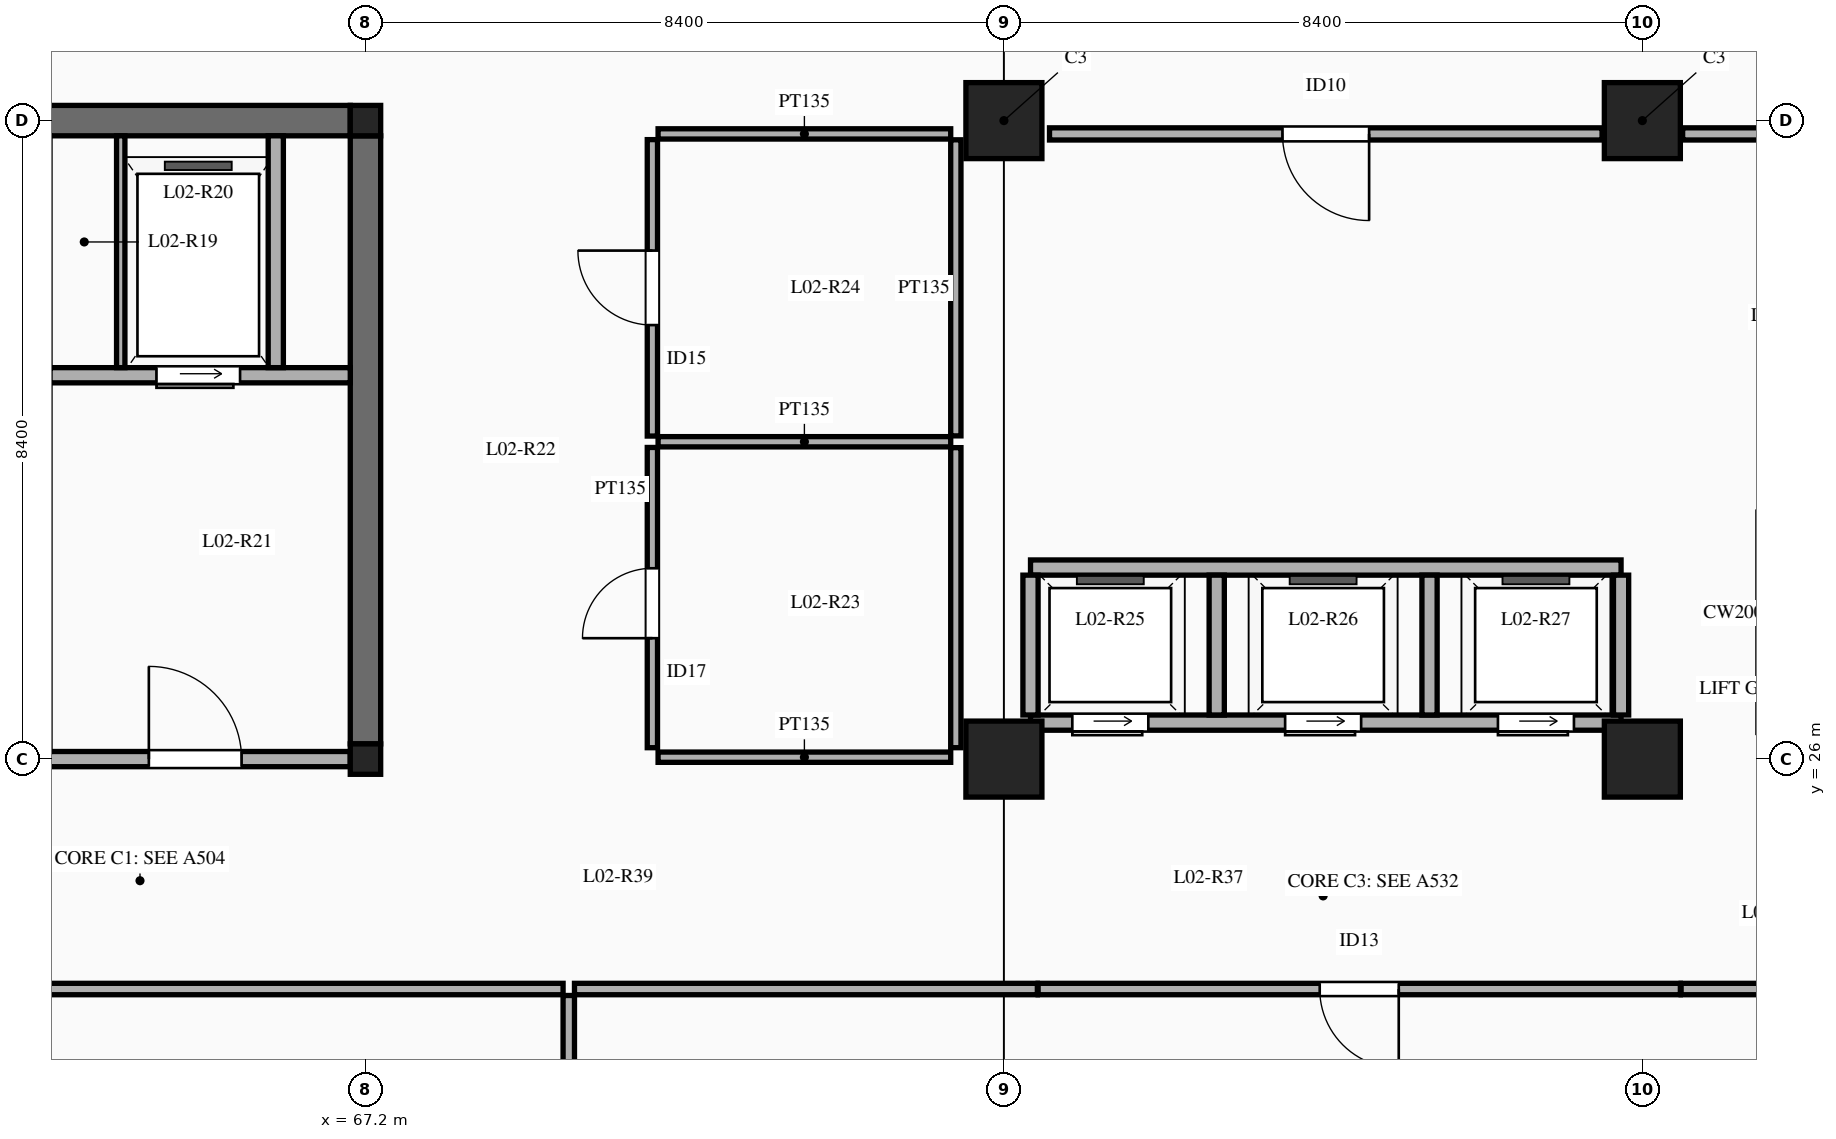
"""IFC4 building model, lengths in metres.
Left out: names, types, materials, properties, quantities, classifications, styles, units other than length and angle.
Written with IfcOpenShell. Run it as: python <this file> out.ifc"""

import sys

from ifc_helpers import new_model, si_unit, direction, frame, frame_2d, origin, origin_2d, place, context, subcontext, project, spatial, rectangle, extrude, element, fill, save


model = new_model("IFC4")
c1 = context("Model", 3, precision=1e-05, world=origin(), true_north=direction((0.0, 1.0)))
c2 = subcontext(c1, "Body", "Model", "MODEL_VIEW")
j1 = project(units=[si_unit("LENGTHUNIT", "METRE"), si_unit("PLANEANGLEUNIT", "RADIAN")], contexts=[c1])
p1 = place(None, origin())
s1 = spatial("IfcSite", under=j1, at=p1, CompositionType="ELEMENT")
p2 = place(p1, origin())
s2 = spatial("IfcBuilding", under=s1, at=p2, CompositionType="ELEMENT")
p3 = place(p2, frame((0.0, 0.0, 10.2)))
s3 = spatial("IfcBuildingStorey", under=s2, at=p3, CompositionType="ELEMENT", Elevation=10.2)
for number, where, z_axis, x_axis in (
    (1, (67.2, 26.0, 0.0), (0.0, 0.0, 1.0), (1.0, 0.0, 0.0)),
    (2, (67.2, 34.4, 0.0), (0.0, 0.0, 1.0), (1.0, 0.0, 0.0)),
):
    element("IfcColumn", number, at=place(p3, frame(where, z_axis=z_axis, x_axis=x_axis)), inside=s3, PredefinedType="COLUMN", context=c2, shape_type="SweptSolid", body=[
        extrude(rectangle(XDim=0.4, YDim=0.4, at=origin_2d()), origin(), (0.0, 0.0, 1.0), 4.8),
    ])
for number, where, z_axis, x_axis in (
    (3, (75.6, 26.0, 0.0), (0.0, 0.0, 1.0), (1.0, 0.0, 0.0)),
    (4, (75.6, 34.4, 0.0), (0.0, 0.0, 1.0), (1.0, 0.0, 0.0)),
    (5, (84.0, 26.0, 0.0), (0.0, 0.0, 1.0), (1.0, 0.0, 0.0)),
    (6, (84.0, 34.4, 0.0), (0.0, 0.0, 1.0), (1.0, 0.0, 0.0)),
):
    element("IfcColumn", number, at=place(p3, frame(where, z_axis=z_axis, x_axis=x_axis)), inside=s3, PredefinedType="COLUMN", context=c2, shape_type="SweptSolid", body=[
        extrude(rectangle(XDim=1.0, YDim=1.0, at=origin_2d()), origin(), (0.0, 0.0, 1.0), 4.8),
    ])
for number, where, z_axis, x_axis in (
    (7, (67.2, 26.2, 0.0), (0.0, 0.0, 1.0), (0.0, 1.0, 0.0)),
    (8, (59.0, 34.4, 0.0), (0.0, 0.0, 1.0), (1.0, 0.0, 0.0)),
):
    element("IfcWall", number, at=place(p3, frame(where, z_axis=z_axis, x_axis=x_axis)), inside=s3, PredefinedType="SHEAR", context=c2, shape_type="SweptSolid", body=[
        extrude(rectangle(XDim=8.0, YDim=0.4, at=frame_2d((4.0, 0.0))), origin(), (0.0, 0.0, 1.0), 4.8),
    ])
p4 = place(p3, frame((59.0, 26.0, 0.0), z_axis=(0.0, 0.0, 1.0), x_axis=(1.0, 0.0, 0.0)))
e9 = element("IfcWall", 9, at=p4, inside=s3, PredefinedType="SOLIDWALL", context=c2, shape_type="SweptSolid", body=[
    extrude(rectangle(XDim=8.0, YDim=0.2, at=frame_2d((4.0, 0.0))), origin(), (0.0, 0.0, 1.0), 3.93),
])
p5 = place(p4, frame((1.55, 0.0, 0.0)))
e10 = element("IfcOpeningElement", 10, at=p5, cuts=e9, PredefinedType="OPENING", context=c2, shape_type="SweptSolid", body=[
    extrude(rectangle(XDim=1.15, YDim=2.15, at=frame_2d((0.575, 1.075))), frame((0.0, 0.11, 0.0), z_axis=(0.0, -1.0, 0.0), x_axis=(1.0, 0.0, 0.0)), (0.0, 0.0, 1.0), 0.22),
])
p6 = place(p4, frame((5.35, 0.0, 0.0)))
e11 = element("IfcOpeningElement", 11, at=p6, cuts=e9, PredefinedType="OPENING", context=c2, shape_type="SweptSolid", body=[
    extrude(rectangle(XDim=1.22, YDim=2.15, at=frame_2d((0.61, 1.075))), frame((0.0, 0.11, 0.0), z_axis=(0.0, -1.0, 0.0), x_axis=(1.0, 0.0, 0.0)), (0.0, 0.0, 1.0), 0.22),
])
p7 = place(p3, frame((63.05, 31.05, 0.0), z_axis=(0.0, 0.0, 1.0), x_axis=(1.0, 0.0, 0.0)))
e12 = element("IfcWall", 12, at=p7, inside=s3, PredefinedType="SOLIDWALL", context=c2, shape_type="SweptSolid", body=[
    extrude(rectangle(XDim=3.95, YDim=0.2, at=frame_2d((1.975, 0.0))), origin(), (0.0, 0.0, 1.0), 4.55),
])
p8 = place(p7, frame((1.4, 0.0, 0.0)))
e13 = element("IfcOpeningElement", 13, at=p8, cuts=e12, PredefinedType="OPENING", context=c2, shape_type="SweptSolid", body=[
    extrude(rectangle(XDim=1.1, YDim=2.15, at=frame_2d((0.55, 1.075))), frame((0.0, 0.11, 0.0), z_axis=(0.0, -1.0, 0.0), x_axis=(1.0, 0.0, 0.0)), (0.0, 0.0, 1.0), 0.22),
])
p9 = place(p3, frame((63.98, 31.15, 0.0), z_axis=(0.0, 0.0, 1.0), x_axis=(0.0, 1.0, 0.0)))
e14 = element("IfcWall", 14, at=p9, inside=s3, PredefinedType="PARTITIONING", context=c2, shape_type="SweptSolid", body=[
    extrude(rectangle(XDim=3.05, YDim=0.11, at=frame_2d((1.525, 0.0))), origin(), (0.0, 0.0, 1.0), 4.55),
])
p10 = place(p3, frame((66.02, 31.15, 0.0), z_axis=(0.0, 0.0, 1.0), x_axis=(0.0, 1.0, 0.0)))
e15 = element("IfcWall", 15, at=p10, inside=s3, PredefinedType="SOLIDWALL", context=c2, shape_type="SweptSolid", body=[
    extrude(rectangle(XDim=3.05, YDim=0.2, at=frame_2d((1.525, 0.0))), origin(), (0.0, 0.0, 1.0), 4.55),
])
p11 = place(p3, frame((75.95, 26.48, 0.0), z_axis=(0.0, 0.0, 1.0), x_axis=(1.0, 0.0, 0.0)))
e16 = element("IfcWall", 16, at=p11, inside=s3, PredefinedType="SOLIDWALL", context=c2, shape_type="SweptSolid", body=[
    extrude(rectangle(XDim=7.77, YDim=0.2, at=frame_2d((3.885, 0.0))), origin(), (0.0, 0.0, 1.0), 4.55),
])
p12 = place(p11, frame((0.55, 0.0, 0.0)))
e17 = element("IfcOpeningElement", 17, at=p12, cuts=e16, PredefinedType="OPENING", context=c2, shape_type="SweptSolid", body=[
    extrude(rectangle(XDim=1.0, YDim=2.15, at=frame_2d((0.5, 1.075))), frame((0.0, 0.11, 0.0), z_axis=(0.0, -1.0, 0.0), x_axis=(1.0, 0.0, 0.0)), (0.0, 0.0, 1.0), 0.22),
])
p13 = place(p11, frame((3.35, 0.0, 0.0)))
e18 = element("IfcOpeningElement", 18, at=p13, cuts=e16, PredefinedType="OPENING", context=c2, shape_type="SweptSolid", body=[
    extrude(rectangle(XDim=1.0, YDim=2.15, at=frame_2d((0.5, 1.075))), frame((0.0, 0.11, 0.0), z_axis=(0.0, -1.0, 0.0), x_axis=(1.0, 0.0, 0.0)), (0.0, 0.0, 1.0), 0.22),
])
p14 = place(p11, frame((6.15, 0.0, 0.0)))
e19 = element("IfcOpeningElement", 19, at=p14, cuts=e16, PredefinedType="OPENING", context=c2, shape_type="SweptSolid", body=[
    extrude(rectangle(XDim=1.0, YDim=2.15, at=frame_2d((0.5, 1.075))), frame((0.0, 0.11, 0.0), z_axis=(0.0, -1.0, 0.0), x_axis=(1.0, 0.0, 0.0)), (0.0, 0.0, 1.0), 0.22),
])
p15 = place(p3, frame((75.95, 28.52, 0.0), z_axis=(0.0, 0.0, 1.0), x_axis=(1.0, 0.0, 0.0)))
e20 = element("IfcWall", 20, at=p15, inside=s3, PredefinedType="SOLIDWALL", context=c2, shape_type="SweptSolid", body=[
    extrude(rectangle(XDim=7.77, YDim=0.2, at=frame_2d((3.885, 0.0))), origin(), (0.0, 0.0, 1.0), 4.55),
])
p16 = place(p3, frame((75.95, 26.58, 0.0), z_axis=(0.0, 0.0, 1.0), x_axis=(0.0, 1.0, 0.0)))
e21 = element("IfcWall", 21, at=p16, inside=s3, PredefinedType="SOLIDWALL", context=c2, shape_type="SweptSolid", body=[
    extrude(rectangle(XDim=1.84, YDim=0.2, at=frame_2d((0.92, 0.0))), origin(), (0.0, 0.0, 1.0), 4.03),
])
for number, where, z_axis, x_axis in (
    (22, (78.4, 26.58, 0.0), (0.0, 0.0, 1.0), (0.0, 1.0, 0.0)),
    (23, (81.2, 26.58, 0.0), (0.0, 0.0, 1.0), (0.0, 1.0, 0.0)),
):
    element("IfcWall", number, at=place(p3, frame(where, z_axis=z_axis, x_axis=x_axis)), inside=s3, PredefinedType="SOLIDWALL", context=c2, shape_type="SweptSolid", body=[
        extrude(rectangle(XDim=1.84, YDim=0.2, at=frame_2d((0.92, 0.0))), origin(), (0.0, 0.0, 1.0), 4.55),
    ])
p17 = place(p3, frame((83.72, 26.58, 0.0), z_axis=(0.0, 0.0, 1.0), x_axis=(0.0, 1.0, 0.0)))
e24 = element("IfcWall", 24, at=p17, inside=s3, PredefinedType="SOLIDWALL", context=c2, shape_type="SweptSolid", body=[
    extrude(rectangle(XDim=1.84, YDim=0.2, at=frame_2d((0.92, 0.0))), origin(), (0.0, 0.0, 1.0), 4.03),
])
p18 = place(p3, frame((70.975, 26.15, 0.0), z_axis=(0.0, 0.0, 1.0), x_axis=(0.0, 1.0, 0.0)))
e25 = element("IfcWall", 25, at=p18, inside=s3, PredefinedType="PARTITIONING", context=c2, shape_type="SweptSolid", body=[
    extrude(rectangle(XDim=3.95, YDim=0.135, at=frame_2d((1.975, 0.0))), origin(), (0.0, 0.0, 1.0), 3.75),
])
p19 = place(p18, frame((1.441, 0.0, 0.0)))
e26 = element("IfcOpeningElement", 26, at=p19, cuts=e25, PredefinedType="OPENING", context=c2, shape_type="SweptSolid", body=[
    extrude(rectangle(XDim=0.92, YDim=2.12, at=frame_2d((0.46, 1.06))), frame((0.0, 0.077, 0.0), z_axis=(0.0, -1.0, 0.0), x_axis=(1.0, 0.0, 0.0)), (0.0, 0.0, 1.0), 0.155),
])
p20 = place(p3, frame((70.975, 30.25, 0.0), z_axis=(0.0, 0.0, 1.0), x_axis=(0.0, 1.0, 0.0)))
e27 = element("IfcWall", 27, at=p20, inside=s3, PredefinedType="PARTITIONING", context=c2, shape_type="SweptSolid", body=[
    extrude(rectangle(XDim=3.9, YDim=0.135, at=frame_2d((1.95, 0.0))), origin(), (0.0, 0.0, 1.0), 3.75),
])
p21 = place(p20, frame((1.46, 0.0, 0.0)))
e28 = element("IfcOpeningElement", 28, at=p21, cuts=e27, PredefinedType="OPENING", context=c2, shape_type="SweptSolid", body=[
    extrude(rectangle(XDim=0.98, YDim=2.15, at=frame_2d((0.49, 1.075))), frame((0.0, 0.077, 0.0), z_axis=(0.0, -1.0, 0.0), x_axis=(1.0, 0.0, 0.0)), (0.0, 0.0, 1.0), 0.155),
])
for number, where, z_axis, x_axis in (
    (29, (71.05, 30.175, 0.0), (0.0, 0.0, 1.0), (1.0, 0.0, 0.0)),
    (30, (71.05, 26.025, 0.0), (0.0, 0.0, 1.0), (1.0, 0.0, 0.0)),
    (31, (71.05, 34.225, 0.0), (0.0, 0.0, 1.0), (1.0, 0.0, 0.0)),
):
    element("IfcWall", number, at=place(p3, frame(where, z_axis=z_axis, x_axis=x_axis)), inside=s3, PredefinedType="PARTITIONING", context=c2, shape_type="SweptSolid", body=[
        extrude(rectangle(XDim=3.85, YDim=0.135, at=frame_2d((1.925, 0.0))), origin(), (0.0, 0.0, 1.0), 3.75),
    ])
p22 = place(p3, frame((76.2, 34.225, 0.0), z_axis=(0.0, 0.0, 1.0), x_axis=(1.0, 0.0, 0.0)))
e32 = element("IfcWall", 32, at=p22, inside=s3, PredefinedType="PARTITIONING", context=c2, shape_type="SweptSolid", body=[
    extrude(rectangle(XDim=7.27, YDim=0.16, at=frame_2d((3.635, 0.0))), origin(), (0.0, 0.0, 1.0), 3.75),
])
p23 = place(p22, frame((3.065, 0.0, 0.0)))
e33 = element("IfcOpeningElement", 33, at=p23, cuts=e32, PredefinedType="OPENING", context=c2, shape_type="SweptSolid", body=[
    extrude(rectangle(XDim=1.14, YDim=2.22, at=frame_2d((0.57, 1.11))), frame((0.0, 0.09, 0.0), z_axis=(0.0, -1.0, 0.0), x_axis=(1.0, 0.0, 0.0)), (0.0, 0.0, 1.0), 0.18),
])
p24 = place(p3, frame((84.53, 34.225, 0.0), z_axis=(0.0, 0.0, 1.0), x_axis=(1.0, 0.0, 0.0)))
e34 = element("IfcWall", 34, at=p24, inside=s3, PredefinedType="PARTITIONING", context=c2, shape_type="SweptSolid", body=[
    extrude(rectangle(XDim=3.705, YDim=0.16, at=frame_2d((1.853, 0.0))), origin(), (0.0, 0.0, 1.0), 3.75),
])
p25 = place(p3, frame((76.05, 22.975, 0.0), z_axis=(0.0, 0.0, 1.0), x_axis=(1.0, 0.0, 0.0)))
e35 = element("IfcWall", 35, at=p25, inside=s3, PredefinedType="PARTITIONING", context=c2, shape_type="SweptSolid", body=[
    extrude(rectangle(XDim=8.45, YDim=0.15, at=frame_2d((4.225, 0.0))), origin(), (0.0, 0.0, 1.0), 3.75),
])
p26 = place(p25, frame((3.705, 0.0, 0.0)))
e36 = element("IfcOpeningElement", 36, at=p26, cuts=e35, PredefinedType="OPENING", context=c2, shape_type="SweptSolid", body=[
    extrude(rectangle(XDim=1.04, YDim=2.15, at=frame_2d((0.52, 1.075))), frame((0.0, 0.085, 0.0), z_axis=(0.0, -1.0, 0.0), x_axis=(1.0, 0.0, 0.0)), (0.0, 0.0, 1.0), 0.17),
])
p27 = place(p3, frame((84.51, 22.975, 0.0), z_axis=(0.0, 0.0, 1.0), x_axis=(1.0, 0.0, 0.0)))
e37 = element("IfcWall", 37, at=p27, inside=s3, PredefinedType="PARTITIONING", context=c2, shape_type="SweptSolid", body=[
    extrude(rectangle(XDim=3.89, YDim=0.15, at=frame_2d((1.945, 0.0))), origin(), (0.0, 0.0, 1.0), 3.75),
])
p28 = place(p3, frame((50.85, 22.975, 0.0), z_axis=(0.0, 0.0, 1.0), x_axis=(1.0, 0.0, 0.0)))
e38 = element("IfcWall", 38, at=p28, inside=s3, PredefinedType="PARTITIONING", context=c2, shape_type="SweptSolid", body=[
    extrude(rectangle(XDim=18.95, YDim=0.15, at=frame_2d((9.475, 0.0))), origin(), (0.0, 0.0, 1.0), 3.75),
])
p29 = place(p28, frame((9.276, 0.0, 0.0)))
e39 = element("IfcOpeningElement", 39, at=p29, cuts=e38, PredefinedType="OPENING", context=c2, shape_type="SweptSolid", body=[
    extrude(rectangle(XDim=1.0, YDim=2.15, at=frame_2d((0.5, 1.075))), frame((0.0, 0.085, 0.0), z_axis=(0.0, -1.0, 0.0), x_axis=(1.0, 0.0, 0.0)), (0.0, 0.0, 1.0), 0.17),
])
p30 = place(p3, frame((69.95, 22.975, 0.0), z_axis=(0.0, 0.0, 1.0), x_axis=(1.0, 0.0, 0.0)))
e40 = element("IfcWall", 40, at=p30, inside=s3, PredefinedType="PARTITIONING", context=c2, shape_type="SweptSolid", body=[
    extrude(rectangle(XDim=6.09, YDim=0.15, at=frame_2d((3.045, 0.0))), origin(), (0.0, 0.0, 1.0), 3.75),
])
p31 = place(p3, frame((69.875, 9.65, 0.0), z_axis=(0.0, 0.0, 1.0), x_axis=(0.0, 1.0, 0.0)))
e41 = element("IfcWall", 41, at=p31, inside=s3, PredefinedType="PARTITIONING", context=c2, shape_type="SweptSolid", body=[
    extrude(rectangle(XDim=13.24, YDim=0.15, at=frame_2d((6.62, 0.0))), origin(), (0.0, 0.0, 1.0), 3.75),
])
p32 = place(p3, frame((74.968, 26.15, 0.0), z_axis=(0.0, 0.0, 1.0), x_axis=(0.0, 1.0, 0.0)))
e42 = element("IfcWall", 42, at=p32, inside=s3, PredefinedType="PARTITIONING", context=c2, shape_type="SweptSolid", body=[
    extrude(rectangle(XDim=3.948, YDim=0.135, at=frame_2d((1.974, 0.0))), origin(), (0.0, 0.0, 1.0), 3.75),
])
p33 = place(p3, frame((74.968, 30.252, 0.0), z_axis=(0.0, 0.0, 1.0), x_axis=(0.0, 1.0, 0.0)))
e43 = element("IfcWall", 43, at=p33, inside=s3, PredefinedType="PARTITIONING", context=c2, shape_type="SweptSolid", body=[
    extrude(rectangle(XDim=3.895, YDim=0.135, at=frame_2d((1.948, 0.0))), origin(), (0.0, 0.0, 1.0), 3.75),
])
p34 = place(p6, origin())
e44 = element("IfcDoor", 44, at=p34, inside=s3, OperationType="SINGLE_SWING_LEFT", PredefinedType="DOOR", context=c2, shape_type="SweptSolid", body=[
    extrude(rectangle(XDim=1.22, YDim=2.15, at=frame_2d((0.61, 1.075))), frame((0.0, 0.025, 0.0), z_axis=(0.0, -1.0, 0.0), x_axis=(1.0, 0.0, 0.0)), (0.0, 0.0, 1.0), 0.05),
])
fill(e11, e44)
p35 = place(p8, frame((1.1, 0.0, 0.0), z_axis=(0.0, 0.0, 1.0), x_axis=(-1.0, 0.0, 0.0)))
e45 = element("IfcDoor", 45, at=p35, inside=s3, OperationType="SLIDING_TO_LEFT", PredefinedType="DOOR", context=c2, shape_type="SweptSolid", body=[
    extrude(rectangle(XDim=1.1, YDim=2.15, at=frame_2d((0.55, 1.075))), frame((0.0, 0.025, 0.0), z_axis=(0.0, -1.0, 0.0), x_axis=(1.0, 0.0, 0.0)), (0.0, 0.0, 1.0), 0.05),
])
fill(e13, e45)
p36 = place(p12, frame((1.0, 0.0, 0.0), z_axis=(0.0, 0.0, 1.0), x_axis=(-1.0, 0.0, 0.0)))
e46 = element("IfcDoor", 46, at=p36, inside=s3, OperationType="SLIDING_TO_LEFT", PredefinedType="DOOR", context=c2, shape_type="SweptSolid", body=[
    extrude(rectangle(XDim=1.0, YDim=2.15, at=frame_2d((0.5, 1.075))), frame((0.0, 0.025, 0.0), z_axis=(0.0, -1.0, 0.0), x_axis=(1.0, 0.0, 0.0)), (0.0, 0.0, 1.0), 0.05),
])
fill(e17, e46)
p37 = place(p13, frame((1.0, 0.0, 0.0), z_axis=(0.0, 0.0, 1.0), x_axis=(-1.0, 0.0, 0.0)))
e47 = element("IfcDoor", 47, at=p37, inside=s3, OperationType="SLIDING_TO_LEFT", PredefinedType="DOOR", context=c2, shape_type="SweptSolid", body=[
    extrude(rectangle(XDim=1.0, YDim=2.15, at=frame_2d((0.5, 1.075))), frame((0.0, 0.025, 0.0), z_axis=(0.0, -1.0, 0.0), x_axis=(1.0, 0.0, 0.0)), (0.0, 0.0, 1.0), 0.05),
])
fill(e18, e47)
p38 = place(p14, frame((1.0, 0.0, 0.0), z_axis=(0.0, 0.0, 1.0), x_axis=(-1.0, 0.0, 0.0)))
e48 = element("IfcDoor", 48, at=p38, inside=s3, OperationType="SLIDING_TO_LEFT", PredefinedType="DOOR", context=c2, shape_type="SweptSolid", body=[
    extrude(rectangle(XDim=1.0, YDim=2.15, at=frame_2d((0.5, 1.075))), frame((0.0, 0.025, 0.0), z_axis=(0.0, -1.0, 0.0), x_axis=(1.0, 0.0, 0.0)), (0.0, 0.0, 1.0), 0.05),
])
fill(e19, e48)
p39 = place(p19, origin())
e49 = element("IfcDoor", 49, at=p39, inside=s3, OperationType="SINGLE_SWING_LEFT", PredefinedType="DOOR", context=c2, shape_type="SweptSolid", body=[
    extrude(rectangle(XDim=0.92, YDim=2.12, at=frame_2d((0.46, 1.06))), frame((0.0, 0.025, 0.0), z_axis=(0.0, -1.0, 0.0), x_axis=(1.0, 0.0, 0.0)), (0.0, 0.0, 1.0), 0.05),
])
fill(e26, e49)
p40 = place(p21, origin())
e50 = element("IfcDoor", 50, at=p40, inside=s3, OperationType="SINGLE_SWING_RIGHT", PredefinedType="DOOR", context=c2, shape_type="SweptSolid", body=[
    extrude(rectangle(XDim=0.98, YDim=2.15, at=frame_2d((0.49, 1.075))), frame((0.0, 0.025, 0.0), z_axis=(0.0, -1.0, 0.0), x_axis=(1.0, 0.0, 0.0)), (0.0, 0.0, 1.0), 0.05),
])
fill(e28, e50)
p41 = place(p23, frame((1.14, 0.0, 0.0), z_axis=(0.0, 0.0, 1.0), x_axis=(-1.0, 0.0, 0.0)))
e51 = element("IfcDoor", 51, at=p41, inside=s3, OperationType="SINGLE_SWING_LEFT", PredefinedType="DOOR", context=c2, shape_type="SweptSolid", body=[
    extrude(rectangle(XDim=1.14, YDim=2.22, at=frame_2d((0.57, 1.11))), frame((0.0, 0.025, 0.0), z_axis=(0.0, -1.0, 0.0), x_axis=(1.0, 0.0, 0.0)), (0.0, 0.0, 1.0), 0.05),
])
fill(e33, e51)
p42 = place(p26, frame((1.04, 0.0, 0.0), z_axis=(0.0, 0.0, 1.0), x_axis=(-1.0, 0.0, 0.0)))
e52 = element("IfcDoor", 52, at=p42, inside=s3, OperationType="SINGLE_SWING_LEFT", PredefinedType="DOOR", context=c2, shape_type="SweptSolid", body=[
    extrude(rectangle(XDim=1.04, YDim=2.15, at=frame_2d((0.52, 1.075))), frame((0.0, 0.025, 0.0), z_axis=(0.0, -1.0, 0.0), x_axis=(1.0, 0.0, 0.0)), (0.0, 0.0, 1.0), 0.05),
])
fill(e36, e52)
save(model, sys.argv[1])
